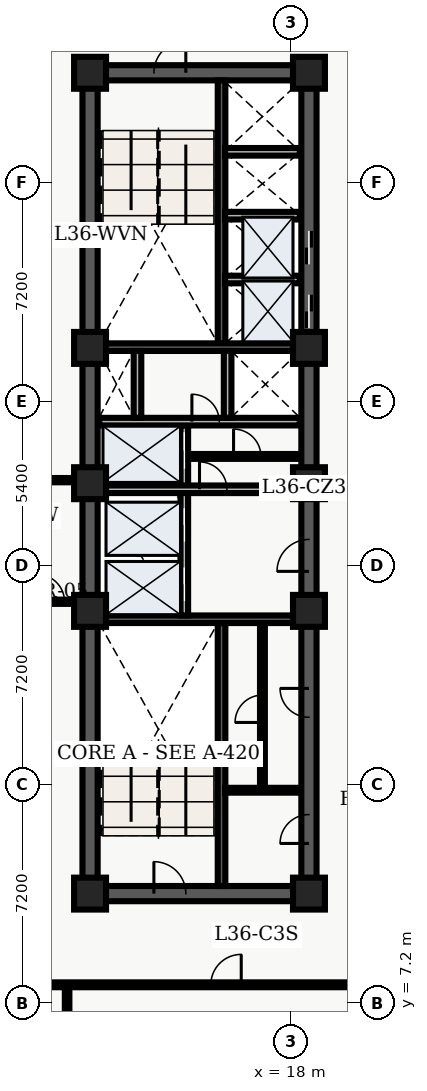
"""IFC4 building model, lengths in metres.
Left out: names, types, materials, properties, quantities, classifications, styles, units other than length and angle.
Written with IfcOpenShell. Run it as: python <this file> out.ifc"""

import sys

from ifc_helpers import new_model, entity, si_unit, converted_unit, direction, frame, origin_with_axes, origin_2d_with_axis, place, context, subcontext, project, spatial, polyline, rectangle, outline, extrude, element, fill, save


model = new_model("IFC4")
c1 = context("Model", 3, precision=1e-05, world=origin_with_axes(), true_north=direction((0.0, 1.0)))
c2 = subcontext(c1, "Body", "Model", "MODEL_VIEW")
j1 = project(units=[si_unit("LENGTHUNIT", "METRE"), converted_unit("PLANEANGLEUNIT", "DEGREE", entity("IfcPlaneAngleMeasure", 0.017), si_unit("PLANEANGLEUNIT", "RADIAN"), dimensions=[0, 0, 0, 0, 0, 0, 0])], contexts=[c1])
p1 = place(None, origin_with_axes())
s1 = spatial("IfcSite", under=j1, at=p1, CompositionType="ELEMENT")
p2 = place(p1, origin_with_axes())
s2 = spatial("IfcBuilding", under=s1, at=p2, CompositionType="ELEMENT")
p3 = place(p2, frame((0.0, 0.0, 148.5), z_axis=(0.0, 0.0, 1.0), x_axis=(1.0, 0.0, 0.0)))
s3 = spatial("IfcBuildingStorey", under=s2, at=p3, CompositionType="ELEMENT", Elevation=148.5)
p4 = place(p3, frame((11.4, 10.8, 0.0), z_axis=(0.0, 0.0, 1.0), x_axis=(0.0, 1.0, 0.0)))
e1 = element("IfcWall", 1, at=p4, inside=s3, PredefinedType="SHEAR", context=c2, shape_type="SweptSolid", body=[
    extrude(outline(polyline([(0.0, -0.25), (27.0, -0.25), (27.0, 0.25), (0.0, 0.25), (0.0, -0.25)])), origin_with_axes(), (0.0, 0.0, 1.0), 3.66),
])
p5 = place(p3, frame((11.4, 10.8, 0.0), z_axis=(0.0, 0.0, 1.0), x_axis=(1.0, 0.0, 0.0)))
e2 = element("IfcWall", 2, at=p5, inside=s3, PredefinedType="SHEAR", context=c2, shape_type="SweptSolid", body=[
    extrude(outline(polyline([(0.0, -0.25), (7.2, -0.25), (7.2, 0.25), (0.0, 0.25), (0.0, -0.25)])), origin_with_axes(), (0.0, 0.0, 1.0), 3.66),
])
p6 = place(p5, frame((2.625, 0.0, 0.0), z_axis=(0.0, 0.0, 1.0), x_axis=(1.0, 0.0, 0.0)))
e3 = element("IfcOpeningElement", 3, at=p6, cuts=e2, PredefinedType="OPENING", context=c2, shape_type="SweptSolid", body=[
    extrude(rectangle(XDim=1.05, YDim=0.52, at=origin_2d_with_axis()), origin_with_axes(), (0.0, 0.0, 1.0), 2.15),
])
p7 = place(p3, frame((11.4, 37.8, 0.0), z_axis=(0.0, 0.0, 1.0), x_axis=(1.0, 0.0, 0.0)))
e4 = element("IfcWall", 4, at=p7, inside=s3, PredefinedType="SHEAR", context=c2, shape_type="SweptSolid", body=[
    extrude(outline(polyline([(0.0, -0.25), (7.2, -0.25), (7.2, 0.25), (0.0, 0.25), (0.0, -0.25)])), origin_with_axes(), (0.0, 0.0, 1.0), 3.66),
])
p8 = place(p7, frame((2.625, 0.0, 0.0), z_axis=(0.0, 0.0, 1.0), x_axis=(1.0, 0.0, 0.0)))
e5 = element("IfcOpeningElement", 5, at=p8, cuts=e4, PredefinedType="OPENING", context=c2, shape_type="SweptSolid", body=[
    extrude(rectangle(XDim=1.05, YDim=0.52, at=origin_2d_with_axis()), origin_with_axes(), (0.0, 0.0, 1.0), 2.15),
])
p9 = place(p3, frame((18.6, 10.8, 0.0), z_axis=(0.0, 0.0, 1.0), x_axis=(0.0, 1.0, 0.0)))
e6 = element("IfcWall", 6, at=p9, inside=s3, PredefinedType="SHEAR", context=c2, shape_type="SweptSolid", body=[
    extrude(outline(polyline([(0.0, -0.25), (13.5, -0.25), (13.5, 0.25), (0.0, 0.25), (0.0, -0.25)])), origin_with_axes(), (0.0, 0.0, 1.0), 3.66),
])
p10 = place(p9, frame((11.125, 0.0, 0.0), z_axis=(0.0, 0.0, 1.0), x_axis=(1.0, 0.0, 0.0)))
e7 = element("IfcOpeningElement", 7, at=p10, cuts=e6, PredefinedType="OPENING", context=c2, shape_type="SweptSolid", body=[
    extrude(rectangle(XDim=1.05, YDim=0.52, at=origin_2d_with_axis()), origin_with_axes(), (0.0, 0.0, 1.0), 2.15),
])
p11 = place(p9, frame((2.125, 0.0, 0.0), z_axis=(0.0, 0.0, 1.0), x_axis=(1.0, 0.0, 0.0)))
e8 = element("IfcOpeningElement", 8, at=p11, cuts=e6, PredefinedType="OPENING", context=c2, shape_type="SweptSolid", body=[
    extrude(rectangle(XDim=0.95, YDim=0.52, at=origin_2d_with_axis()), origin_with_axes(), (0.0, 0.0, 1.0), 2.15),
])
p12 = place(p9, frame((6.275, 0.0, 0.0), z_axis=(0.0, 0.0, 1.0), x_axis=(1.0, 0.0, 0.0)))
e9 = element("IfcOpeningElement", 9, at=p12, cuts=e6, PredefinedType="OPENING", context=c2, shape_type="SweptSolid", body=[
    extrude(rectangle(XDim=0.95, YDim=0.52, at=origin_2d_with_axis()), origin_with_axes(), (0.0, 0.0, 1.0), 2.15),
])
p13 = place(p3, frame((18.6, 24.3, 0.0), z_axis=(0.0, 0.0, 1.0), x_axis=(0.0, 1.0, 0.0)))
e10 = element("IfcWall", 10, at=p13, inside=s3, PredefinedType="SHEAR", context=c2, shape_type="SweptSolid", body=[
    extrude(outline(polyline([(0.0, -0.25), (13.5, -0.25), (13.5, 0.25), (0.0, 0.25), (0.0, -0.25)])), origin_with_axes(), (0.0, 0.0, 1.0), 3.66),
])
p14 = place(p13, frame((5.65, 0.0, 0.0), z_axis=(0.0, 0.0, 1.0), x_axis=(1.0, 0.0, 0.0)))
e11 = element("IfcOpeningElement", 11, at=p14, cuts=e10, PredefinedType="OPENING", context=c2, shape_type="SweptSolid", body=[
    extrude(rectangle(XDim=1.1, YDim=0.52, at=origin_2d_with_axis()), origin_with_axes(), (0.0, 0.0, 1.0), 2.15),
])
p15 = place(p13, frame((7.75, 0.0, 0.0), z_axis=(0.0, 0.0, 1.0), x_axis=(1.0, 0.0, 0.0)))
e12 = element("IfcOpeningElement", 12, at=p15, cuts=e10, PredefinedType="OPENING", context=c2, shape_type="SweptSolid", body=[
    extrude(rectangle(XDim=1.1, YDim=0.52, at=origin_2d_with_axis()), origin_with_axes(), (0.0, 0.0, 1.0), 2.15),
])
p16 = place(p3, frame((15.725, 11.05, 0.0), z_axis=(0.0, 0.0, 1.0), x_axis=(0.0, 1.0, 0.0)))
e13 = element("IfcWall", 13, at=p16, inside=s3, PredefinedType="SHEAR", context=c2, shape_type="SweptSolid", body=[
    extrude(outline(polyline([(0.0, -0.125), (8.65, -0.125), (8.65, 0.125), (0.0, 0.125), (0.0, -0.125)])), origin_with_axes(), (0.0, 0.0, 1.0), 3.66),
])
p17 = place(p3, frame((11.65, 19.825, 0.0), z_axis=(0.0, 0.0, 1.0), x_axis=(1.0, 0.0, 0.0)))
e14 = element("IfcWall", 14, at=p17, inside=s3, PredefinedType="SHEAR", context=c2, shape_type="SweptSolid", body=[
    extrude(outline(polyline([(0.0, -0.125), (6.7, -0.125), (6.7, 0.125), (0.0, 0.125), (0.0, -0.125)])), origin_with_axes(), (0.0, 0.0, 1.0), 3.66),
])
p18 = place(p3, frame((15.725, 28.9, 0.0), z_axis=(0.0, 0.0, 1.0), x_axis=(0.0, 1.0, 0.0)))
e15 = element("IfcWall", 15, at=p18, inside=s3, PredefinedType="SHEAR", context=c2, shape_type="SweptSolid", body=[
    extrude(outline(polyline([(0.0, -0.125), (8.65, -0.125), (8.65, 0.125), (0.0, 0.125), (0.0, -0.125)])), origin_with_axes(), (0.0, 0.0, 1.0), 3.66),
])
p19 = place(p3, frame((11.65, 28.775, 0.0), z_axis=(0.0, 0.0, 1.0), x_axis=(1.0, 0.0, 0.0)))
e16 = element("IfcWall", 16, at=p19, inside=s3, PredefinedType="SHEAR", context=c2, shape_type="SweptSolid", body=[
    extrude(outline(polyline([(0.0, -0.125), (6.7, -0.125), (6.7, 0.125), (0.0, 0.125), (0.0, -0.125)])), origin_with_axes(), (0.0, 0.0, 1.0), 3.66),
])
p20 = place(p3, frame((14.5, 19.95, 0.0), z_axis=(0.0, 0.0, 1.0), x_axis=(0.0, 1.0, 0.0)))
e17 = element("IfcWall", 17, at=p20, inside=s3, PredefinedType="SOLIDWALL", context=c2, shape_type="SweptSolid", body=[
    extrude(outline(polyline([(0.0, -0.125), (6.25, -0.125), (6.25, 0.125), (0.0, 0.125), (0.0, -0.125)])), origin_with_axes(), (0.0, 0.0, 1.0), 2.7),
])
p21 = place(p20, frame((1.025, 0.0, 0.0), z_axis=(0.0, 0.0, 1.0), x_axis=(1.0, 0.0, 0.0)))
e18 = element("IfcOpeningElement", 18, at=p21, cuts=e17, PredefinedType="OPENING", context=c2, shape_type="SweptSolid", body=[
    extrude(rectangle(XDim=1.1, YDim=0.27, at=origin_2d_with_axis()), origin_with_axes(), (0.0, 0.0, 1.0), 2.15),
])
p22 = place(p20, frame((2.975, 0.0, 0.0), z_axis=(0.0, 0.0, 1.0), x_axis=(1.0, 0.0, 0.0)))
e19 = element("IfcOpeningElement", 19, at=p22, cuts=e17, PredefinedType="OPENING", context=c2, shape_type="SweptSolid", body=[
    extrude(rectangle(XDim=1.1, YDim=0.27, at=origin_2d_with_axis()), origin_with_axes(), (0.0, 0.0, 1.0), 2.15),
])
p23 = place(p20, frame((5.425, 0.0, 0.0), z_axis=(0.0, 0.0, 1.0), x_axis=(1.0, 0.0, 0.0)))
e20 = element("IfcOpeningElement", 20, at=p23, cuts=e17, PredefinedType="OPENING", context=c2, shape_type="SweptSolid", body=[
    extrude(rectangle(XDim=1.2, YDim=0.27, at=origin_2d_with_axis()), origin_with_axes(), (0.0, 0.0, 1.0), 2.15),
])
p24 = place(p3, frame((11.7, 24.1, 0.0), z_axis=(0.0, 0.0, 1.0), x_axis=(1.0, 0.0, 0.0)))
e21 = element("IfcWall", 21, at=p24, inside=s3, PredefinedType="SOLIDWALL", context=c2, shape_type="SweptSolid", body=[
    extrude(outline(polyline([(0.0, -0.125), (6.6, -0.125), (6.6, 0.125), (0.0, 0.125), (0.0, -0.125)])), origin_with_axes(), (0.0, 0.0, 1.0), 2.7),
])
p25 = place(p24, frame((3.75, 0.0, 0.0), z_axis=(0.0, 0.0, 1.0), x_axis=(1.0, 0.0, 0.0)))
e22 = element("IfcOpeningElement", 22, at=p25, cuts=e21, PredefinedType="OPENING", context=c2, shape_type="SweptSolid", body=[
    extrude(rectangle(XDim=0.9, YDim=0.27, at=origin_2d_with_axis()), origin_with_axes(), (0.0, 0.0, 1.0), 2.15),
])
p26 = place(p3, frame((11.7, 26.325, 0.0), z_axis=(0.0, 0.0, 1.0), x_axis=(1.0, 0.0, 0.0)))
e23 = element("IfcWall", 23, at=p26, inside=s3, PredefinedType="SOLIDWALL", context=c2, shape_type="SweptSolid", body=[
    extrude(outline(polyline([(0.0, -0.125), (6.6, -0.125), (6.6, 0.125), (0.0, 0.125), (0.0, -0.125)])), origin_with_axes(), (0.0, 0.0, 1.0), 2.7),
])
p27 = place(p26, frame((3.5, 0.0, 0.0), z_axis=(0.0, 0.0, 1.0), x_axis=(1.0, 0.0, 0.0)))
e24 = element("IfcOpeningElement", 24, at=p27, cuts=e23, PredefinedType="OPENING", context=c2, shape_type="SweptSolid", body=[
    extrude(rectangle(XDim=0.9, YDim=0.27, at=origin_2d_with_axis()), origin_with_axes(), (0.0, 0.0, 1.0), 2.15),
])
for number, where, z_axis, x_axis in (
    (25, (12.96, 26.45, 0.0), (0.0, 0.0, 1.0), (0.0, 1.0, 0.0)),
    (26, (15.925, 26.45, 0.0), (0.0, 0.0, 1.0), (0.0, 1.0, 0.0)),
):
    element("IfcWall", number, at=place(p3, frame(where, z_axis=z_axis, x_axis=x_axis)), inside=s3, PredefinedType="SOLIDWALL", context=c2, shape_type="SweptSolid", body=[
        extrude(outline(polyline([(0.0, -0.125), (2.2, -0.125), (2.2, 0.125), (0.0, 0.125), (0.0, -0.125)])), origin_with_axes(), (0.0, 0.0, 1.0), 2.7),
    ])
for number, where, z_axis, x_axis in (
    (27, (11.4, 10.8, 0.0), (0.0, 0.0, 1.0), (1.0, 0.0, 0.0)),
    (28, (11.4, 20.1, 0.0), (0.0, 0.0, 1.0), (1.0, 0.0, 0.0)),
    (29, (11.4, 24.3, 0.0), (0.0, 0.0, 1.0), (1.0, 0.0, 0.0)),
    (30, (11.4, 28.75, 0.0), (0.0, 0.0, 1.0), (1.0, 0.0, 0.0)),
    (31, (11.4, 37.8, 0.0), (0.0, 0.0, 1.0), (1.0, 0.0, 0.0)),
    (32, (18.6, 10.8, 0.0), (0.0, 0.0, 1.0), (1.0, 0.0, 0.0)),
    (33, (18.6, 20.1, 0.0), (0.0, 0.0, 1.0), (1.0, 0.0, 0.0)),
    (34, (18.6, 24.3, 0.0), (0.0, 0.0, 1.0), (1.0, 0.0, 0.0)),
    (35, (18.6, 28.75, 0.0), (0.0, 0.0, 1.0), (1.0, 0.0, 0.0)),
    (36, (18.6, 37.8, 0.0), (0.0, 0.0, 1.0), (1.0, 0.0, 0.0)),
):
    element("IfcColumn", number, at=place(p3, frame(where, z_axis=z_axis, x_axis=x_axis)), inside=s3, PredefinedType="COLUMN", context=c2, shape_type="SweptSolid", body=[
        extrude(rectangle(XDim=1.05, YDim=1.05, at=origin_2d_with_axis()), origin_with_axes(), (0.0, 0.0, 1.0), 3.9),
    ])
p28 = place(p3, frame((14.62, 25.18, 0.0), z_axis=(0.0, 0.0, 1.0), x_axis=(1.0, 0.0, 0.0)))
e37 = element("IfcWall", 37, at=p28, inside=s3, PredefinedType="PARTITIONING", context=c2, shape_type="SweptSolid", body=[
    extrude(outline(polyline([(0.0, -0.08), (3.68, -0.08), (3.68, 0.08), (0.0, 0.08), (0.0, -0.08)])), origin_with_axes(), (0.0, 0.0, 1.0), 2.7),
])
p29 = place(p28, frame((1.95, 0.0, 0.0), z_axis=(0.0, 0.0, 1.0), x_axis=(1.0, 0.0, 0.0)))
e38 = element("IfcOpeningElement", 38, at=p29, cuts=e37, PredefinedType="OPENING", context=c2, shape_type="SweptSolid", body=[
    extrude(rectangle(XDim=0.9, YDim=0.18, at=origin_2d_with_axis()), origin_with_axes(), (0.0, 0.0, 1.0), 2.15),
])
p30 = place(p3, frame((15.84, 14.2, 0.0), z_axis=(0.0, 0.0, 1.0), x_axis=(1.0, 0.0, 0.0)))
e39 = element("IfcWall", 39, at=p30, inside=s3, PredefinedType="PARTITIONING", context=c2, shape_type="SweptSolid", body=[
    extrude(outline(polyline([(0.0, -0.08), (2.46, -0.08), (2.46, 0.08), (0.0, 0.08), (0.0, -0.08)])), origin_with_axes(), (0.0, 0.0, 1.0), 2.7),
])
p31 = place(p3, frame((17.07, 14.28, 0.0), z_axis=(0.0, 0.0, 1.0), x_axis=(0.0, 1.0, 0.0)))
e40 = element("IfcWall", 40, at=p31, inside=s3, PredefinedType="PARTITIONING", context=c2, shape_type="SweptSolid", body=[
    extrude(outline(polyline([(0.0, -0.08), (5.42, -0.08), (5.42, 0.08), (0.0, 0.08), (0.0, -0.08)])), origin_with_axes(), (0.0, 0.0, 1.0), 2.7),
])
p32 = place(p31, frame((2.6, 0.0, 0.0), z_axis=(0.0, 0.0, 1.0), x_axis=(1.0, 0.0, 0.0)))
e41 = element("IfcOpeningElement", 41, at=p32, cuts=e40, PredefinedType="OPENING", context=c2, shape_type="SweptSolid", body=[
    extrude(rectangle(XDim=0.9, YDim=0.18, at=origin_2d_with_axis()), origin_with_axes(), (0.0, 0.0, 1.0), 2.15),
])
for number, where, z_axis, x_axis in (
    (42, (15.84, 31.0, 0.0), (0.0, 0.0, 1.0), (1.0, 0.0, 0.0)),
    (43, (15.84, 33.1, 0.0), (0.0, 0.0, 1.0), (1.0, 0.0, 0.0)),
    (44, (15.84, 35.2, 0.0), (0.0, 0.0, 1.0), (1.0, 0.0, 0.0)),
):
    element("IfcWall", number, at=place(p3, frame(where, z_axis=z_axis, x_axis=x_axis)), inside=s3, PredefinedType="SOLIDWALL", context=c2, shape_type="SweptSolid", body=[
        extrude(outline(polyline([(0.0, -0.125), (2.46, -0.125), (2.46, 0.125), (0.0, 0.125), (0.0, -0.125)])), origin_with_axes(), (0.0, 0.0, 1.0), 2.7),
    ])
p33 = place(p3, frame((9.52, 20.4, 0.0), z_axis=(0.0, 0.0, 1.0), x_axis=(1.0, 0.0, 0.0)))
e45 = element("IfcWall", 45, at=p33, inside=s3, PredefinedType="PARTITIONING", context=c2, shape_type="SweptSolid", body=[
    extrude(outline(polyline([(0.0, -0.07), (1.58, -0.07), (1.58, 0.07), (0.0, 0.07), (0.0, -0.07)])), origin_with_axes(), (0.0, 0.0, 1.0), 2.7),
])
p34 = place(p33, frame((0.59, 0.0, 0.0), z_axis=(0.0, 0.0, 1.0), x_axis=(1.0, 0.0, 0.0)))
e46 = element("IfcOpeningElement", 46, at=p34, cuts=e45, PredefinedType="OPENING", context=c2, shape_type="SweptSolid", body=[
    extrude(rectangle(XDim=0.9, YDim=0.16, at=origin_2d_with_axis()), origin_with_axes(), (0.0, 0.0, 1.0), 2.15),
])
p35 = place(p3, frame((9.52, 24.4, 0.0), z_axis=(0.0, 0.0, 1.0), x_axis=(1.0, 0.0, 0.0)))
e47 = element("IfcWall", 47, at=p35, inside=s3, PredefinedType="PARTITIONING", context=c2, shape_type="SweptSolid", body=[
    extrude(outline(polyline([(0.0, -0.07), (1.58, -0.07), (1.58, 0.07), (0.0, 0.07), (0.0, -0.07)])), origin_with_axes(), (0.0, 0.0, 1.0), 2.7),
])
p36 = place(p3, frame((2.6, 7.8, 0.0), z_axis=(0.0, 0.0, 1.0), x_axis=(1.0, 0.0, 0.0)))
e48 = element("IfcWall", 48, at=p36, inside=s3, PredefinedType="PARTITIONING", context=c2, shape_type="SweptSolid", body=[
    extrude(outline(polyline([(0.0, -0.08), (18.55, -0.08), (18.55, 0.08), (0.0, 0.08), (0.0, -0.08)])), origin_with_axes(), (0.0, 0.0, 1.0), 2.7),
])
p37 = place(p36, frame((3.737, 0.0, 0.0), z_axis=(0.0, 0.0, 1.0), x_axis=(1.0, 0.0, 0.0)))
e49 = element("IfcOpeningElement", 49, at=p37, cuts=e48, PredefinedType="OPENING", context=c2, shape_type="SweptSolid", body=[
    extrude(rectangle(XDim=1.0, YDim=0.18, at=origin_2d_with_axis()), origin_with_axes(), (0.0, 0.0, 1.0), 2.15),
])
p38 = place(p36, frame((13.273, 0.0, 0.0), z_axis=(0.0, 0.0, 1.0), x_axis=(1.0, 0.0, 0.0)))
e50 = element("IfcOpeningElement", 50, at=p38, cuts=e48, PredefinedType="OPENING", context=c2, shape_type="SweptSolid", body=[
    extrude(rectangle(XDim=1.0, YDim=0.18, at=origin_2d_with_axis()), origin_with_axes(), (0.0, 0.0, 1.0), 2.15),
])
p39 = place(p3, frame((10.645, 0.335, 0.0), z_axis=(0.0, 0.0, 1.0), x_axis=(0.0, 1.0, 0.0)))
e51 = element("IfcWall", 51, at=p39, inside=s3, PredefinedType="PARTITIONING", context=c2, shape_type="SweptSolid", body=[
    extrude(outline(polyline([(0.0, -0.075), (7.365, -0.075), (7.365, 0.075), (0.0, 0.075), (0.0, -0.075)])), origin_with_axes(), (0.0, 0.0, 1.0), 2.7),
])
p40 = place(p13, frame((5.65, 0.0, 0.0), z_axis=(0.0, 0.0, 1.0), x_axis=(1.0, 0.0, 0.0)))
e52 = element("IfcDoor", 52, at=p40, inside=s3, OperationType="SLIDING_TO_LEFT", PredefinedType="DOOR", context=c2, shape_type="SweptSolid", body=[
    extrude(rectangle(XDim=1.1, YDim=0.09, at=origin_2d_with_axis()), origin_with_axes(), (0.0, 0.0, 1.0), 2.15),
])
fill(e11, e52)
p41 = place(p13, frame((7.75, 0.0, 0.0), z_axis=(0.0, 0.0, 1.0), x_axis=(1.0, 0.0, 0.0)))
e53 = element("IfcDoor", 53, at=p41, inside=s3, OperationType="SLIDING_TO_RIGHT", PredefinedType="DOOR", context=c2, shape_type="SweptSolid", body=[
    extrude(rectangle(XDim=1.1, YDim=0.09, at=origin_2d_with_axis()), origin_with_axes(), (0.0, 0.0, 1.0), 2.15),
])
fill(e12, e53)
p42 = place(p20, frame((1.025, 0.0, 0.0), z_axis=(0.0, 0.0, 1.0), x_axis=(1.0, 0.0, 0.0)))
e54 = element("IfcDoor", 54, at=p42, inside=s3, OperationType="SLIDING_TO_LEFT", PredefinedType="DOOR", context=c2, shape_type="SweptSolid", body=[
    extrude(rectangle(XDim=1.1, YDim=0.09, at=origin_2d_with_axis()), origin_with_axes(), (0.0, 0.0, 1.0), 2.15),
])
fill(e18, e54)
p43 = place(p20, frame((2.975, 0.0, 0.0), z_axis=(0.0, 0.0, 1.0), x_axis=(1.0, 0.0, 0.0)))
e55 = element("IfcDoor", 55, at=p43, inside=s3, OperationType="SLIDING_TO_RIGHT", PredefinedType="DOOR", context=c2, shape_type="SweptSolid", body=[
    extrude(rectangle(XDim=1.1, YDim=0.09, at=origin_2d_with_axis()), origin_with_axes(), (0.0, 0.0, 1.0), 2.15),
])
fill(e19, e55)
p44 = place(p20, frame((5.425, 0.0, 0.0), z_axis=(0.0, 0.0, 1.0), x_axis=(1.0, 0.0, 0.0)))
e56 = element("IfcDoor", 56, at=p44, inside=s3, OperationType="DOUBLE_DOOR_SLIDING", PredefinedType="DOOR", context=c2, shape_type="SweptSolid", body=[
    extrude(rectangle(XDim=1.2, YDim=0.09, at=origin_2d_with_axis()), origin_with_axes(), (0.0, 0.0, 1.0), 2.15),
])
fill(e20, e56)
p45 = place(p5, frame((2.625, 0.0, 0.0), z_axis=(0.0, 0.0, 1.0), x_axis=(1.0, 0.0, 0.0)))
e57 = element("IfcDoor", 57, at=p45, inside=s3, OperationType="SINGLE_SWING_LEFT", PredefinedType="DOOR", context=c2, shape_type="SweptSolid", body=[
    extrude(rectangle(XDim=1.05, YDim=0.09, at=origin_2d_with_axis()), origin_with_axes(), (0.0, 0.0, 1.0), 2.15),
])
fill(e3, e57)
p46 = place(p7, frame((2.625, 0.0, 0.0), z_axis=(0.0, 0.0, 1.0), x_axis=(1.0, 0.0, 0.0)))
e58 = element("IfcDoor", 58, at=p46, inside=s3, OperationType="SINGLE_SWING_RIGHT", PredefinedType="DOOR", context=c2, shape_type="SweptSolid", body=[
    extrude(rectangle(XDim=1.05, YDim=0.09, at=origin_2d_with_axis()), origin_with_axes(), (0.0, 0.0, 1.0), 2.15),
])
fill(e5, e58)
p47 = place(p9, frame((11.125, 0.0, 0.0), z_axis=(0.0, 0.0, 1.0), x_axis=(1.0, 0.0, 0.0)))
e59 = element("IfcDoor", 59, at=p47, inside=s3, OperationType="SINGLE_SWING_LEFT", PredefinedType="DOOR", context=c2, shape_type="SweptSolid", body=[
    extrude(rectangle(XDim=1.05, YDim=0.09, at=origin_2d_with_axis()), origin_with_axes(), (0.0, 0.0, 1.0), 2.15),
])
fill(e7, e59)
p48 = place(p26, frame((3.5, 0.0, 0.0), z_axis=(0.0, 0.0, 1.0), x_axis=(1.0, 0.0, 0.0)))
e60 = element("IfcDoor", 60, at=p48, inside=s3, OperationType="SINGLE_SWING_LEFT", PredefinedType="DOOR", context=c2, shape_type="SweptSolid", body=[
    extrude(rectangle(XDim=0.9, YDim=0.09, at=origin_2d_with_axis()), origin_with_axes(), (0.0, 0.0, 1.0), 2.15),
])
fill(e24, e60)
p49 = place(p24, frame((3.75, 0.0, 0.0), z_axis=(0.0, 0.0, 1.0), x_axis=(1.0, 0.0, 0.0)))
e61 = element("IfcDoor", 61, at=p49, inside=s3, OperationType="SINGLE_SWING_LEFT", PredefinedType="DOOR", context=c2, shape_type="SweptSolid", body=[
    extrude(rectangle(XDim=0.9, YDim=0.09, at=origin_2d_with_axis()), origin_with_axes(), (0.0, 0.0, 1.0), 2.15),
])
fill(e22, e61)
p50 = place(p28, frame((1.95, 0.0, 0.0), z_axis=(0.0, 0.0, 1.0), x_axis=(1.0, 0.0, 0.0)))
e62 = element("IfcDoor", 62, at=p50, inside=s3, OperationType="SINGLE_SWING_LEFT", PredefinedType="DOOR", context=c2, shape_type="SweptSolid", body=[
    extrude(rectangle(XDim=0.9, YDim=0.09, at=origin_2d_with_axis()), origin_with_axes(), (0.0, 0.0, 1.0), 2.15),
])
fill(e38, e62)
p51 = place(p9, frame((2.125, 0.0, 0.0), z_axis=(0.0, 0.0, 1.0), x_axis=(1.0, 0.0, 0.0)))
e63 = element("IfcDoor", 63, at=p51, inside=s3, OperationType="SINGLE_SWING_LEFT", PredefinedType="DOOR", context=c2, shape_type="SweptSolid", body=[
    extrude(rectangle(XDim=0.95, YDim=0.09, at=origin_2d_with_axis()), origin_with_axes(), (0.0, 0.0, 1.0), 2.15),
])
fill(e8, e63)
p52 = place(p31, frame((2.6, 0.0, 0.0), z_axis=(0.0, 0.0, 1.0), x_axis=(1.0, 0.0, 0.0)))
e64 = element("IfcDoor", 64, at=p52, inside=s3, OperationType="SINGLE_SWING_LEFT", PredefinedType="DOOR", context=c2, shape_type="SweptSolid", body=[
    extrude(rectangle(XDim=0.9, YDim=0.09, at=origin_2d_with_axis()), origin_with_axes(), (0.0, 0.0, 1.0), 2.15),
])
fill(e41, e64)
p53 = place(p9, frame((6.275, 0.0, 0.0), z_axis=(0.0, 0.0, 1.0), x_axis=(1.0, 0.0, 0.0)))
e65 = element("IfcDoor", 65, at=p53, inside=s3, OperationType="SINGLE_SWING_RIGHT", PredefinedType="DOOR", context=c2, shape_type="SweptSolid", body=[
    extrude(rectangle(XDim=0.95, YDim=0.09, at=origin_2d_with_axis()), origin_with_axes(), (0.0, 0.0, 1.0), 2.15),
])
fill(e9, e65)
p54 = place(p33, frame((0.59, 0.0, 0.0), z_axis=(0.0, 0.0, 1.0), x_axis=(1.0, 0.0, 0.0)))
e66 = element("IfcDoor", 66, at=p54, inside=s3, OperationType="SINGLE_SWING_LEFT", PredefinedType="DOOR", context=c2, shape_type="SweptSolid", body=[
    extrude(rectangle(XDim=0.9, YDim=0.084, at=origin_2d_with_axis()), origin_with_axes(), (0.0, 0.0, 1.0), 2.15),
])
fill(e46, e66)
p55 = place(p36, frame((13.273, 0.0, 0.0), z_axis=(0.0, 0.0, 1.0), x_axis=(1.0, 0.0, 0.0)))
e67 = element("IfcDoor", 67, at=p55, inside=s3, OperationType="SINGLE_SWING_RIGHT", PredefinedType="DOOR", context=c2, shape_type="SweptSolid", body=[
    extrude(rectangle(XDim=1.0, YDim=0.09, at=origin_2d_with_axis()), origin_with_axes(), (0.0, 0.0, 1.0), 2.15),
])
fill(e50, e67)
save(model, sys.argv[1])
